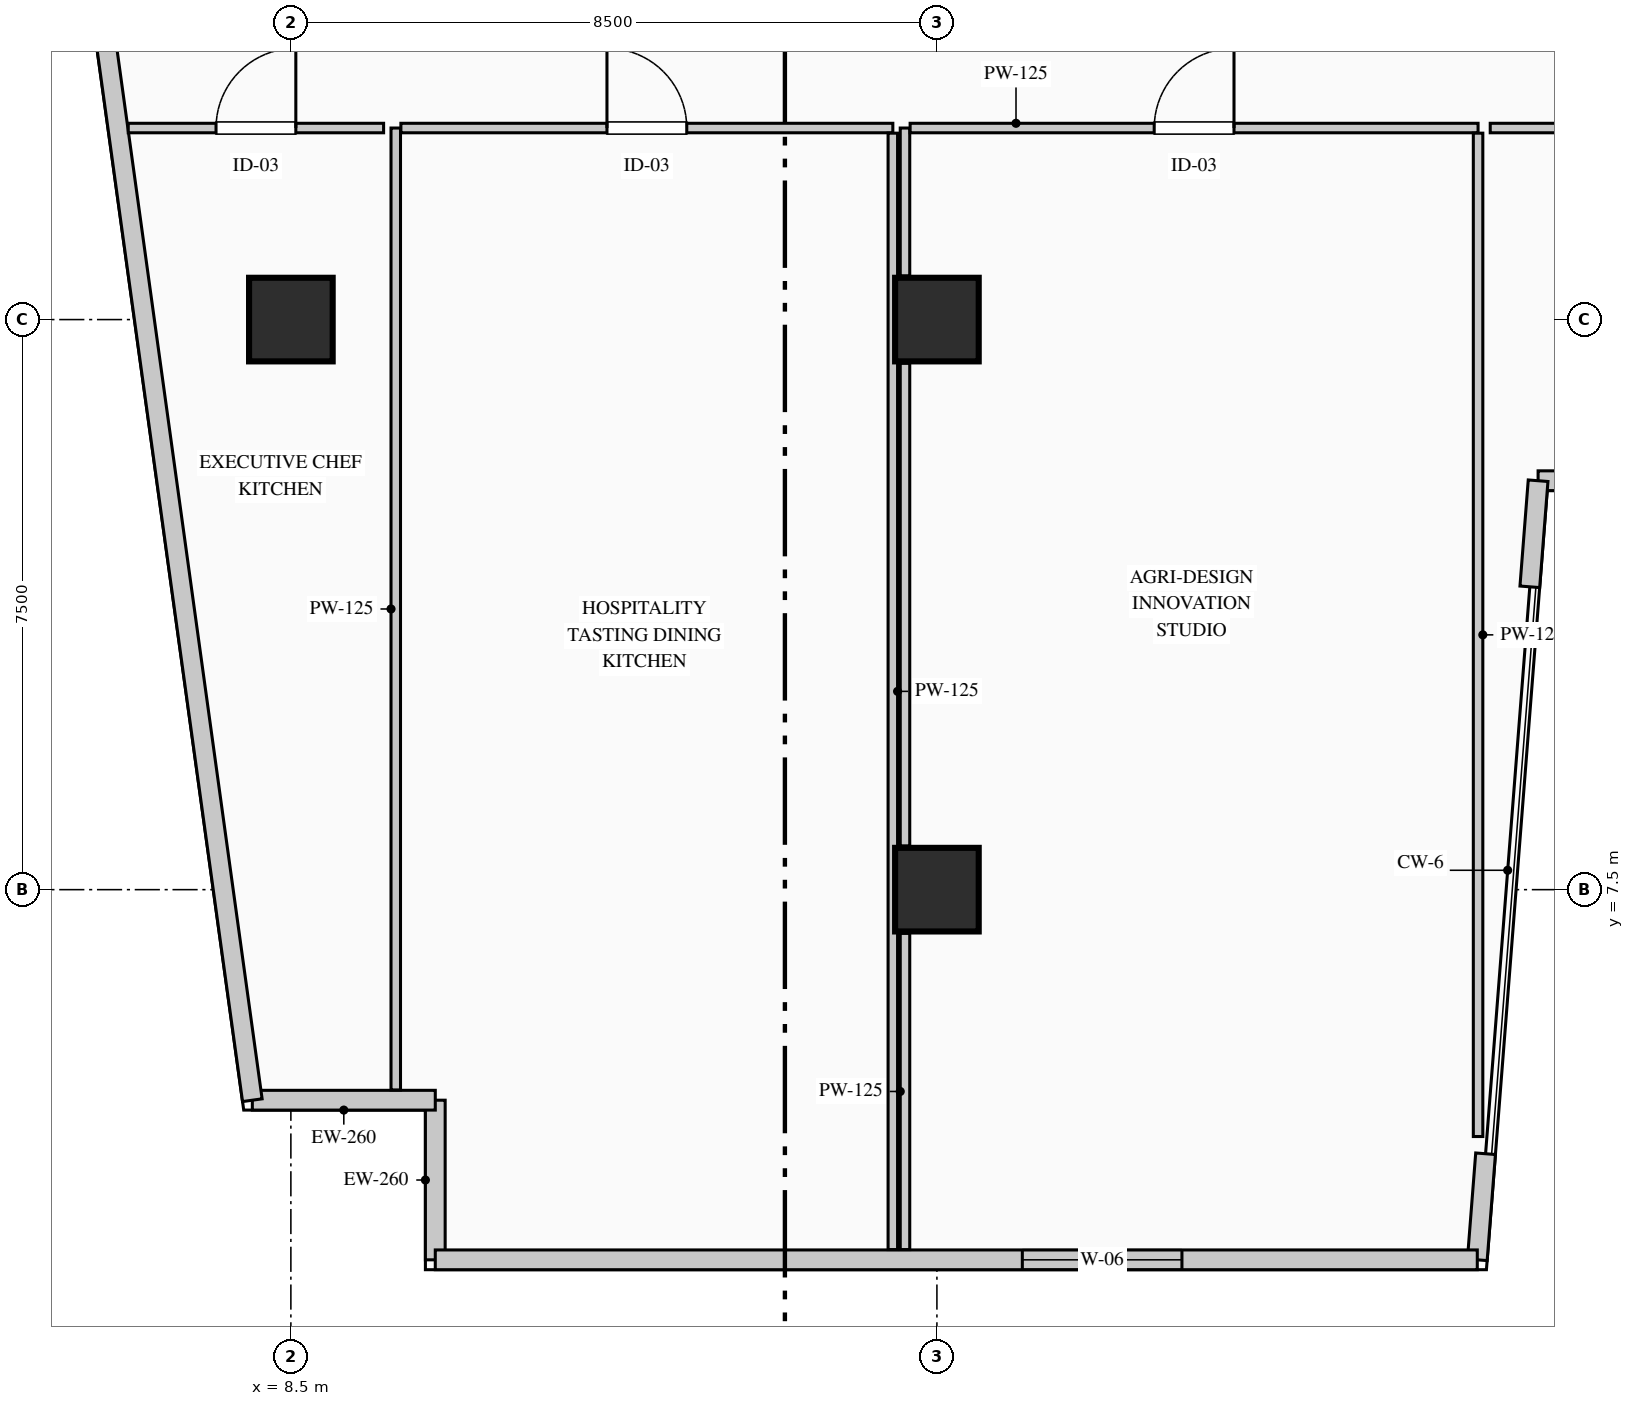
"""IFC4 building model, lengths in metres.
Left out: names, types, materials, properties, quantities, classifications, styles, units other than length and angle.
Written with IfcOpenShell. Run it as: python <this file> out.ifc"""

import sys

from ifc_helpers import new_model, si_unit, direction, frame, frame_2d, origin, origin_2d, place, context, subcontext, project, spatial, rectangle, extrude, element, fill, save


model = new_model("IFC4")
c1 = context("Model", 3, precision=1e-05, world=origin(), true_north=direction((0.0, 1.0)))
c2 = subcontext(c1, "Body", "Model", "MODEL_VIEW")
j1 = project(units=[si_unit("LENGTHUNIT", "METRE"), si_unit("PLANEANGLEUNIT", "RADIAN")], contexts=[c1])
p1 = place(None, origin())
s1 = spatial("IfcSite", under=j1, at=p1, CompositionType="ELEMENT")
p2 = place(p1, origin())
s2 = spatial("IfcBuilding", under=s1, at=p2, CompositionType="ELEMENT")
p3 = place(p2, frame((0.0, 0.0, 174.6)))
s3 = spatial("IfcBuildingStorey", under=s2, at=p3, CompositionType="ELEMENT", Elevation=174.6)
for number, where, z_axis, x_axis in (
    (1, (8.5, 15.0, 0.0), (0.0, 0.0, 1.0), (1.0, 0.0, 0.0)),
    (2, (17.0, 7.5, 0.0), (0.0, 0.0, 1.0), (1.0, 0.0, 0.0)),
    (3, (17.0, 15.0, 0.0), (0.0, 0.0, 1.0), (1.0, 0.0, 0.0)),
):
    element("IfcColumn", number, at=place(p3, frame(where, z_axis=z_axis, x_axis=x_axis)), inside=s3, PredefinedType="COLUMN", context=c2, shape_type="SweptSolid", body=[
        extrude(rectangle(XDim=1.1, YDim=1.1, at=origin_2d()), origin(), (0.0, 0.0, 1.0), 3.95),
    ])
p4 = place(p3, frame((10.4, 2.63, 0.0), z_axis=(0.0, 0.0, 1.0), x_axis=(0.0, 1.0, 0.0)))
e4 = element("IfcWall", 4, at=p4, inside=s3, PredefinedType="STANDARD", context=c2, shape_type="SweptSolid", body=[
    extrude(rectangle(XDim=2.1, YDim=0.26, at=frame_2d((1.05, 0.0))), origin(), (0.0, 0.0, 1.0), 3.6),
])
p5 = place(p3, frame((10.4, 4.73, 0.0), z_axis=(0.0, 0.0, 1.0), x_axis=(-1.0, 0.0, 0.0)))
e5 = element("IfcWall", 5, at=p5, inside=s3, PredefinedType="STANDARD", context=c2, shape_type="SweptSolid", body=[
    extrude(rectangle(XDim=2.407, YDim=0.26, at=frame_2d((1.204, 0.0))), origin(), (0.0, 0.0, 1.0), 3.6),
])
p6 = place(p3, frame((7.993, 4.73, 0.0), z_axis=(0.0, 0.0, 1.0), x_axis=(-0.136989009016, 0.990572567462, 0.0)))
e6 = element("IfcWall", 6, at=p6, inside=s3, PredefinedType="STANDARD", context=c2, shape_type="SweptSolid", body=[
    extrude(rectangle(XDim=36.888, YDim=0.26, at=frame_2d((18.444, 0.0))), origin(), (0.0, 0.0, 1.0), 3.6),
])
p7 = place(p6, frame((20.949, 0.0, 0.9)))
e7 = element("IfcOpeningElement", 7, at=p7, cuts=e6, PredefinedType="OPENING", context=c2, shape_type="SweptSolid", body=[
    extrude(rectangle(XDim=2.1, YDim=2.0, at=frame_2d((1.05, 1.0))), frame((0.0, 0.14, 0.0), z_axis=(0.0, -1.0, 0.0), x_axis=(1.0, 0.0, 0.0)), (0.0, 0.0, 1.0), 0.28),
])
p8 = place(p3, frame((32.675, 12.88, 0.0), z_axis=(0.0, 0.0, 1.0), x_axis=(-1.0, 0.0, 0.0)))
e8 = element("IfcWall", 8, at=p8, inside=s3, PredefinedType="STANDARD", context=c2, shape_type="SweptSolid", body=[
    extrude(rectangle(XDim=7.765, YDim=0.26, at=frame_2d((3.883, 0.0))), origin(), (0.0, 0.0, 1.0), 3.6),
])
p9 = place(p8, frame((2.983, 0.0, 0.9)))
e9 = element("IfcOpeningElement", 9, at=p9, cuts=e8, PredefinedType="OPENING", context=c2, shape_type="SweptSolid", body=[
    extrude(rectangle(XDim=1.8, YDim=2.1, at=frame_2d((0.9, 1.05))), frame((0.0, 0.14, 0.0), z_axis=(0.0, -1.0, 0.0), x_axis=(1.0, 0.0, 0.0)), (0.0, 0.0, 1.0), 0.28),
])
for number, where, z_axis, x_axis in (
    (10, (24.91, 12.88, 0.0), (0.0, 0.0, 1.0), (-0.078, -0.997, 0.0)),
    (11, (24.219, 4.026, 0.0), (0.0, 0.0, 1.0), (-0.078, -0.997, 0.0)),
):
    element("IfcWall", number, at=place(p3, frame(where, z_axis=z_axis, x_axis=x_axis)), inside=s3, PredefinedType="STANDARD", context=c2, shape_type="SweptSolid", body=[
        extrude(rectangle(XDim=1.4, YDim=0.26, at=frame_2d((0.7, 0.0))), origin(), (0.0, 0.0, 1.0), 3.6),
    ])
p10 = place(p3, frame((24.11, 2.63, 0.0), z_axis=(0.0, 0.0, 1.0), x_axis=(-1.0, 0.0, 0.0)))
e12 = element("IfcWall", 12, at=p10, inside=s3, PredefinedType="STANDARD", context=c2, shape_type="SweptSolid", body=[
    extrude(rectangle(XDim=13.71, YDim=0.26, at=frame_2d((6.855, 0.0))), origin(), (0.0, 0.0, 1.0), 3.6),
])
p11 = place(p10, frame((3.886, 0.0, 0.9)))
e13 = element("IfcOpeningElement", 13, at=p11, cuts=e12, PredefinedType="OPENING", context=c2, shape_type="SweptSolid", body=[
    extrude(rectangle(XDim=2.1, YDim=2.0, at=frame_2d((1.05, 1.0))), frame((0.0, 0.14, 0.0), z_axis=(0.0, -1.0, 0.0), x_axis=(1.0, 0.0, 0.0)), (0.0, 0.0, 1.0), 0.28),
])
p12 = place(p3, frame((16.58, 2.765, 0.0), z_axis=(0.0, 0.0, 1.0), x_axis=(0.0, 1.0, 0.0)))
e14 = element("IfcWall", 14, at=p12, inside=s3, PredefinedType="PARTITIONING", context=c2, shape_type="SweptSolid", body=[
    extrude(rectangle(XDim=4.16, YDim=0.125, at=frame_2d((2.08, 0.0))), origin(), (0.0, 0.0, 1.0), 3.6),
])
p13 = place(p3, frame((16.58, 8.075, 0.0), z_axis=(0.0, 0.0, 1.0), x_axis=(0.0, 1.0, 0.0)))
e15 = element("IfcWall", 15, at=p13, inside=s3, PredefinedType="PARTITIONING", context=c2, shape_type="SweptSolid", body=[
    extrude(rectangle(XDim=6.35, YDim=0.125, at=frame_2d((3.175, 0.0))), origin(), (0.0, 0.0, 1.0), 3.6),
])
p14 = place(p3, frame((16.58, 15.575, 0.0), z_axis=(0.0, 0.0, 1.0), x_axis=(0.0, 1.0, 0.0)))
e16 = element("IfcWall", 16, at=p14, inside=s3, PredefinedType="PARTITIONING", context=c2, shape_type="SweptSolid", body=[
    extrude(rectangle(XDim=1.945, YDim=0.125, at=frame_2d((0.973, 0.0))), origin(), (0.0, 0.0, 1.0), 3.6),
])
p15 = place(p3, frame((16.647, 17.52, 0.0), z_axis=(0.0, 0.0, 1.0), x_axis=(1.0, 0.0, 0.0)))
e17 = element("IfcWall", 17, at=p15, inside=s3, PredefinedType="PARTITIONING", context=c2, shape_type="SweptSolid", body=[
    extrude(rectangle(XDim=7.473, YDim=0.125, at=frame_2d((3.736, 0.0))), origin(), (0.0, 0.0, 1.0), 3.6),
])
p16 = place(p15, frame((3.211, 0.0, 0.0)))
e18 = element("IfcOpeningElement", 18, at=p16, cuts=e17, PredefinedType="OPENING", context=c2, shape_type="SweptSolid", body=[
    extrude(rectangle(XDim=1.05, YDim=2.15, at=frame_2d((0.525, 1.075))), frame((0.0, 0.073, 0.0), z_axis=(0.0, -1.0, 0.0), x_axis=(1.0, 0.0, 0.0)), (0.0, 0.0, 1.0), 0.145),
])
p17 = place(p3, frame((24.12, 17.452, 0.0), z_axis=(0.0, 0.0, 1.0), x_axis=(0.0, -1.0, 0.0)))
e19 = element("IfcWall", 19, at=p17, inside=s3, PredefinedType="PARTITIONING", context=c2, shape_type="SweptSolid", body=[
    extrude(rectangle(XDim=13.2, YDim=0.125, at=frame_2d((6.6, 0.0))), origin(), (0.0, 0.0, 1.0), 3.6),
])
p18 = place(p3, frame((9.88, 4.865, 0.0), z_axis=(0.0, 0.0, 1.0), x_axis=(0.0, 1.0, 0.0)))
e20 = element("IfcWall", 20, at=p18, inside=s3, PredefinedType="PARTITIONING", context=c2, shape_type="SweptSolid", body=[
    extrude(rectangle(XDim=12.655, YDim=0.125, at=frame_2d((6.328, 0.0))), origin(), (0.0, 0.0, 1.0), 3.6),
])
p19 = place(p3, frame((9.948, 17.52, 0.0), z_axis=(0.0, 0.0, 1.0), x_axis=(1.0, 0.0, 0.0)))
e21 = element("IfcWall", 21, at=p19, inside=s3, PredefinedType="PARTITIONING", context=c2, shape_type="SweptSolid", body=[
    extrude(rectangle(XDim=6.472, YDim=0.125, at=frame_2d((3.236, 0.0))), origin(), (0.0, 0.0, 1.0), 3.6),
])
p20 = place(p19, frame((2.711, 0.0, 0.0)))
e22 = element("IfcOpeningElement", 22, at=p20, cuts=e21, PredefinedType="OPENING", context=c2, shape_type="SweptSolid", body=[
    extrude(rectangle(XDim=1.05, YDim=2.15, at=frame_2d((0.525, 1.075))), frame((0.0, 0.073, 0.0), z_axis=(0.0, -1.0, 0.0), x_axis=(1.0, 0.0, 0.0)), (0.0, 0.0, 1.0), 0.145),
])
p21 = place(p3, frame((16.42, 17.452, 0.0), z_axis=(0.0, 0.0, 1.0), x_axis=(0.0, -1.0, 0.0)))
e23 = element("IfcWall", 23, at=p21, inside=s3, PredefinedType="PARTITIONING", context=c2, shape_type="SweptSolid", body=[
    extrude(rectangle(XDim=14.688, YDim=0.125, at=frame_2d((7.344, 0.0))), origin(), (0.0, 0.0, 1.0), 3.6),
])
p22 = place(p3, frame((6.36, 17.52, 0.0), z_axis=(0.0, 0.0, 1.0), x_axis=(1.0, 0.0, 0.0)))
e24 = element("IfcWall", 24, at=p22, inside=s3, PredefinedType="PARTITIONING", context=c2, shape_type="SweptSolid", body=[
    extrude(rectangle(XDim=3.36, YDim=0.125, at=frame_2d((1.68, 0.0))), origin(), (0.0, 0.0, 1.0), 3.6),
])
p23 = place(p22, frame((1.155, 0.0, 0.0)))
e25 = element("IfcOpeningElement", 25, at=p23, cuts=e24, PredefinedType="OPENING", context=c2, shape_type="SweptSolid", body=[
    extrude(rectangle(XDim=1.05, YDim=2.15, at=frame_2d((0.525, 1.075))), frame((0.0, 0.073, 0.0), z_axis=(0.0, -1.0, 0.0), x_axis=(1.0, 0.0, 0.0)), (0.0, 0.0, 1.0), 0.145),
])
p24 = place(p3, frame((24.28, 17.52, 0.0), z_axis=(0.0, 0.0, 1.0), x_axis=(1.0, 0.0, 0.0)))
e26 = element("IfcWall", 26, at=p24, inside=s3, PredefinedType="PARTITIONING", context=c2, shape_type="SweptSolid", body=[
    extrude(rectangle(XDim=8.14, YDim=0.125, at=frame_2d((4.07, 0.0))), origin(), (0.0, 0.0, 1.0), 3.185),
])
p25 = place(p24, frame((3.545, 0.0, 0.0)))
e27 = element("IfcOpeningElement", 27, at=p25, cuts=e26, PredefinedType="OPENING", context=c2, shape_type="SweptSolid", body=[
    extrude(rectangle(XDim=1.05, YDim=2.15, at=frame_2d((0.525, 1.075))), frame((0.0, 0.073, 0.0), z_axis=(0.0, -1.0, 0.0), x_axis=(1.0, 0.0, 0.0)), (0.0, 0.0, 1.0), 0.145),
])
p26 = place(p11, origin())
e28 = element("IfcWindow", 28, at=p26, inside=s3, PartitioningType="DOUBLE_PANEL_VERTICAL", PredefinedType="WINDOW", context=c2, shape_type="SweptSolid", body=[
    extrude(rectangle(XDim=2.1, YDim=2.0, at=frame_2d((1.05, 1.0))), frame((0.0, 0.03, 0.0), z_axis=(0.0, -1.0, 0.0), x_axis=(1.0, 0.0, 0.0)), (0.0, 0.0, 1.0), 0.06),
])
fill(e13, e28)
p27 = place(p16, origin())
e29 = element("IfcDoor", 29, at=p27, inside=s3, OperationType="SINGLE_SWING_RIGHT", PredefinedType="DOOR", context=c2, shape_type="SweptSolid", body=[
    extrude(rectangle(XDim=1.05, YDim=2.15, at=frame_2d((0.525, 1.075))), frame((0.0, 0.025, 0.0), z_axis=(0.0, -1.0, 0.0), x_axis=(1.0, 0.0, 0.0)), (0.0, 0.0, 1.0), 0.05),
])
fill(e18, e29)
p28 = place(p20, origin())
e30 = element("IfcDoor", 30, at=p28, inside=s3, OperationType="SINGLE_SWING_LEFT", PredefinedType="DOOR", context=c2, shape_type="SweptSolid", body=[
    extrude(rectangle(XDim=1.05, YDim=2.15, at=frame_2d((0.525, 1.075))), frame((0.0, 0.025, 0.0), z_axis=(0.0, -1.0, 0.0), x_axis=(1.0, 0.0, 0.0)), (0.0, 0.0, 1.0), 0.05),
])
fill(e22, e30)
p29 = place(p23, origin())
e31 = element("IfcDoor", 31, at=p29, inside=s3, OperationType="SINGLE_SWING_RIGHT", PredefinedType="DOOR", context=c2, shape_type="SweptSolid", body=[
    extrude(rectangle(XDim=1.05, YDim=2.15, at=frame_2d((0.525, 1.075))), frame((0.0, 0.025, 0.0), z_axis=(0.0, -1.0, 0.0), x_axis=(1.0, 0.0, 0.0)), (0.0, 0.0, 1.0), 0.05),
])
fill(e25, e31)
save(model, sys.argv[1])
